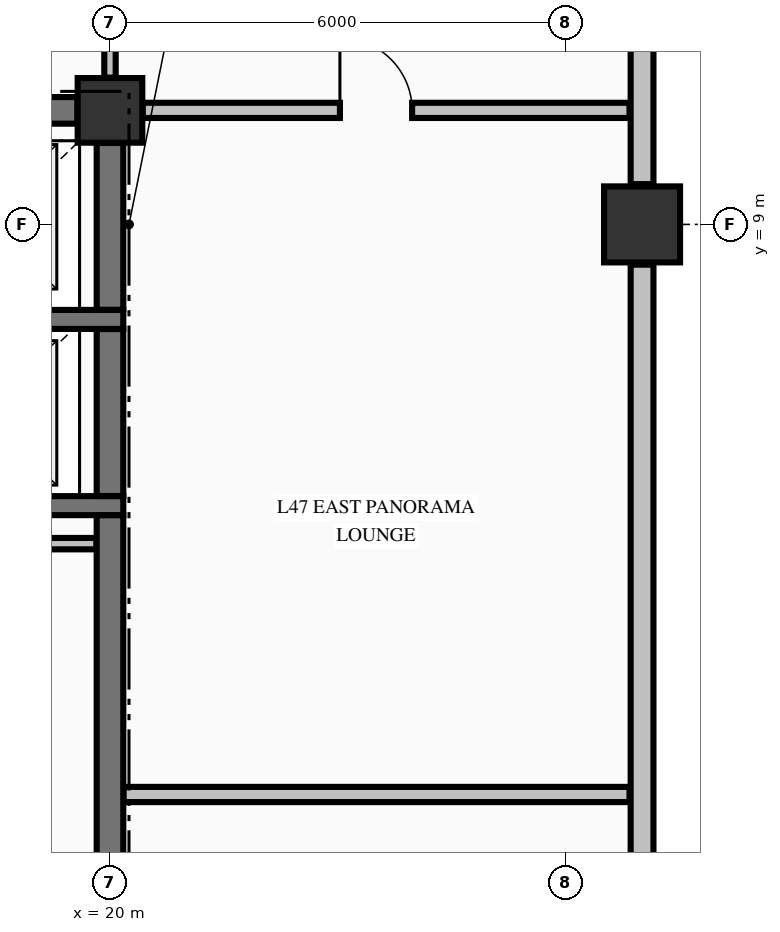
"""IFC4 building model, lengths in metres.
Left out: names, types, materials, properties, quantities, classifications, styles, units other than length and angle.
Written with IfcOpenShell. Run it as: python <this file> out.ifc"""

import sys

from ifc_helpers import new_model, si_unit, direction, frame, frame_2d, origin, origin_2d, place, context, subcontext, project, spatial, rectangle, extrude, element, fill, save


model = new_model("IFC4")
c1 = context("Model", 3, precision=1e-05, world=origin(), true_north=direction((0.0, 1.0)))
c2 = subcontext(c1, "Body", "Model", "MODEL_VIEW")
j1 = project(units=[si_unit("LENGTHUNIT", "METRE"), si_unit("PLANEANGLEUNIT", "RADIAN")], contexts=[c1])
p1 = place(None, origin())
s1 = spatial("IfcSite", under=j1, at=p1, CompositionType="ELEMENT")
p2 = place(p1, origin())
s2 = spatial("IfcBuilding", under=s1, at=p2, CompositionType="ELEMENT")
p3 = place(p2, frame((0.0, 0.0, 183.06)))
s3 = spatial("IfcBuildingStorey", under=s2, at=p3, CompositionType="ELEMENT", Elevation=183.06)
p4 = place(p3, frame((27.0, 9.0, -0.25), z_axis=(0.0, 0.0, 1.0), x_axis=(1.0, 0.0, 0.0)))
e1 = element("IfcColumn", 1, at=p4, inside=s3, PredefinedType="COLUMN", context=c2, shape_type="SweptSolid", body=[
    extrude(rectangle(XDim=1.0, YDim=1.0, at=origin_2d()), origin(), (0.0, 0.0, 1.0), 3.225),
])
p5 = place(p3, frame((20.0, 10.5, -0.25), z_axis=(0.0, 0.0, 1.0), x_axis=(1.0, 0.0, 0.0)))
e2 = element("IfcColumn", 2, at=p5, inside=s3, PredefinedType="COLUMN", context=c2, shape_type="SweptSolid", body=[
    extrude(rectangle(XDim=0.85, YDim=0.85, at=origin_2d()), origin(), (0.0, 0.0, 1.0), 3.225),
])
p6 = place(p3, frame((27.0, 0.53, 0.0), z_axis=(0.0, 0.0, 1.0), x_axis=(0.0, 1.0, 0.0)))
e3 = element("IfcWall", 3, at=p6, inside=s3, PredefinedType="STANDARD", context=c2, shape_type="SweptSolid", body=[
    extrude(rectangle(XDim=7.94, YDim=0.3, at=frame_2d((3.97, 0.0))), origin(), (0.0, 0.0, 1.0), 2.367),
])
p7 = place(p3, frame((27.0, 9.53, 0.0), z_axis=(0.0, 0.0, 1.0), x_axis=(0.0, 1.0, 0.0)))
e4 = element("IfcWall", 4, at=p7, inside=s3, PredefinedType="STANDARD", context=c2, shape_type="SweptSolid", body=[
    extrude(rectangle(XDim=9.44, YDim=0.3, at=frame_2d((4.72, 0.0))), origin(), (0.0, 0.0, 1.0), 2.367),
])
for number, where, z_axis, x_axis in (
    (5, (17.025, 5.3, 0.0), (0.0, 0.0, 1.0), (1.0, 0.0, 0.0)),
    (6, (17.025, 7.75, 0.0), (0.0, 0.0, 1.0), (1.0, 0.0, 0.0)),
):
    element("IfcWall", number, at=place(p3, frame(where, z_axis=z_axis, x_axis=x_axis)), inside=s3, PredefinedType="SOLIDWALL", context=c2, shape_type="SweptSolid", body=[
        extrude(rectangle(XDim=3.15, YDim=0.25, at=frame_2d((1.575, 0.0))), origin(), (0.0, 0.0, 1.0), 2.975),
    ])
p8 = place(p3, frame((14.7, 10.5, 0.0), z_axis=(0.0, 0.0, 1.0), x_axis=(1.0, 0.0, 0.0)))
e7 = element("IfcWall", 7, at=p8, inside=s3, PredefinedType="SHEAR", context=c2, shape_type="SweptSolid", body=[
    extrude(rectangle(XDim=4.871, YDim=0.35, at=frame_2d((2.436, 0.0))), origin(), (0.0, 0.0, 1.0), 2.975),
])
p9 = place(p8, frame((0.7, 0.0, 0.0)))
e8 = element("IfcOpeningElement", 8, at=p9, cuts=e7, PredefinedType="OPENING", context=c2, shape_type="SweptSolid", body=[
    extrude(rectangle(XDim=0.95, YDim=2.02, at=frame_2d((0.475, 1.01))), frame((0.0, 0.185, 0.0), z_axis=(0.0, -1.0, 0.0), x_axis=(1.0, 0.0, 0.0)), (0.0, 0.0, 1.0), 0.37),
])
p10 = place(p3, frame((20.178, 1.5, 0.0), z_axis=(0.0, 0.0, 1.0), x_axis=(1.0, 0.0, 0.0)))
e9 = element("IfcWall", 9, at=p10, inside=s3, PredefinedType="PARTITIONING", context=c2, shape_type="SweptSolid", body=[
    extrude(rectangle(XDim=6.657, YDim=0.2, at=frame_2d((3.329, 0.0))), origin(), (0.0, 0.0, 1.0), 2.975),
])
p11 = place(p3, frame((14.878, 4.8, 0.0), z_axis=(0.0, 0.0, 1.0), x_axis=(1.0, 0.0, 0.0)))
e10 = element("IfcWall", 10, at=p11, inside=s3, PredefinedType="PARTITIONING", context=c2, shape_type="SweptSolid", body=[
    extrude(rectangle(XDim=4.944, YDim=0.15, at=frame_2d((2.472, 0.0))), origin(), (0.0, 0.0, 1.0), 2.975),
])
p12 = place(p3, frame((20.431, 10.5, 0.0), z_axis=(0.0, 0.0, 1.0), x_axis=(1.0, 0.0, 0.0)))
e11 = element("IfcWall", 11, at=p12, inside=s3, PredefinedType="PARTITIONING", context=c2, shape_type="SweptSolid", body=[
    extrude(rectangle(XDim=6.404, YDim=0.2, at=frame_2d((3.202, 0.0))), origin(), (0.0, 0.0, 1.0), 2.975),
])
p13 = place(p12, frame((2.594, 0.0, 0.0)))
e12 = element("IfcOpeningElement", 12, at=p13, cuts=e11, PredefinedType="OPENING", context=c2, shape_type="SweptSolid", body=[
    extrude(rectangle(XDim=0.95, YDim=2.15, at=frame_2d((0.475, 1.075))), frame((0.0, 0.11, 0.0), z_axis=(0.0, -1.0, 0.0), x_axis=(1.0, 0.0, 0.0)), (0.0, 0.0, 1.0), 0.22),
])
p14 = place(p3, frame((20.0, 0.429, 0.0), z_axis=(0.0, 0.0, 1.0), x_axis=(0.0, 1.0, 0.0)))
e13 = element("IfcWall", 13, at=p14, inside=s3, PredefinedType="SHEAR", context=c2, shape_type="SweptSolid", body=[
    extrude(rectangle(XDim=4.744, YDim=0.35, at=frame_2d((2.372, 0.0))), origin(), (0.0, 0.0, 1.0), 2.975),
])
p15 = place(p3, frame((20.0, 5.427, 0.0), z_axis=(0.0, 0.0, 1.0), x_axis=(0.0, 1.0, 0.0)))
e14 = element("IfcWall", 14, at=p15, inside=s3, PredefinedType="SHEAR", context=c2, shape_type="SweptSolid", body=[
    extrude(rectangle(XDim=2.196, YDim=0.35, at=frame_2d((1.098, 0.0))), origin(), (0.0, 0.0, 1.0), 2.975),
])
p16 = place(p3, frame((20.0, 7.877, 0.0), z_axis=(0.0, 0.0, 1.0), x_axis=(0.0, 1.0, 0.0)))
e15 = element("IfcWall", 15, at=p16, inside=s3, PredefinedType="SHEAR", context=c2, shape_type="SweptSolid", body=[
    extrude(rectangle(XDim=2.194, YDim=0.35, at=frame_2d((1.097, 0.0))), origin(), (0.0, 0.0, 1.0), 2.975),
])
p17 = place(p3, frame((20.0, 10.931, 0.0), z_axis=(0.0, 0.0, 1.0), x_axis=(0.0, 1.0, 0.0)))
e16 = element("IfcWall", 16, at=p17, inside=s3, PredefinedType="PARTITIONING", context=c2, shape_type="SweptSolid", body=[
    extrude(rectangle(XDim=2.766, YDim=0.15, at=frame_2d((1.383, 0.0))), origin(), (0.0, 0.0, 1.0), 2.167),
])
p18 = place(p17, frame((0.744, 0.0, 0.0)))
e17 = element("IfcOpeningElement", 17, at=p18, cuts=e16, PredefinedType="OPENING", context=c2, shape_type="SweptSolid", body=[
    extrude(rectangle(XDim=0.95, YDim=2.02, at=frame_2d((0.475, 1.01))), frame((0.0, 0.085, 0.0), z_axis=(0.0, -1.0, 0.0), x_axis=(1.0, 0.0, 0.0)), (0.0, 0.0, 1.0), 0.17),
])
p19 = place(p13, origin())
e18 = element("IfcDoor", 18, at=p19, inside=s3, OperationType="SINGLE_SWING_LEFT", PredefinedType="DOOR", context=c2, shape_type="SweptSolid", body=[
    extrude(rectangle(XDim=0.95, YDim=2.15, at=frame_2d((0.475, 1.075))), frame((0.0, 0.025, 0.0), z_axis=(0.0, -1.0, 0.0), x_axis=(1.0, 0.0, 0.0)), (0.0, 0.0, 1.0), 0.05),
])
fill(e12, e18)
save(model, sys.argv[1])
